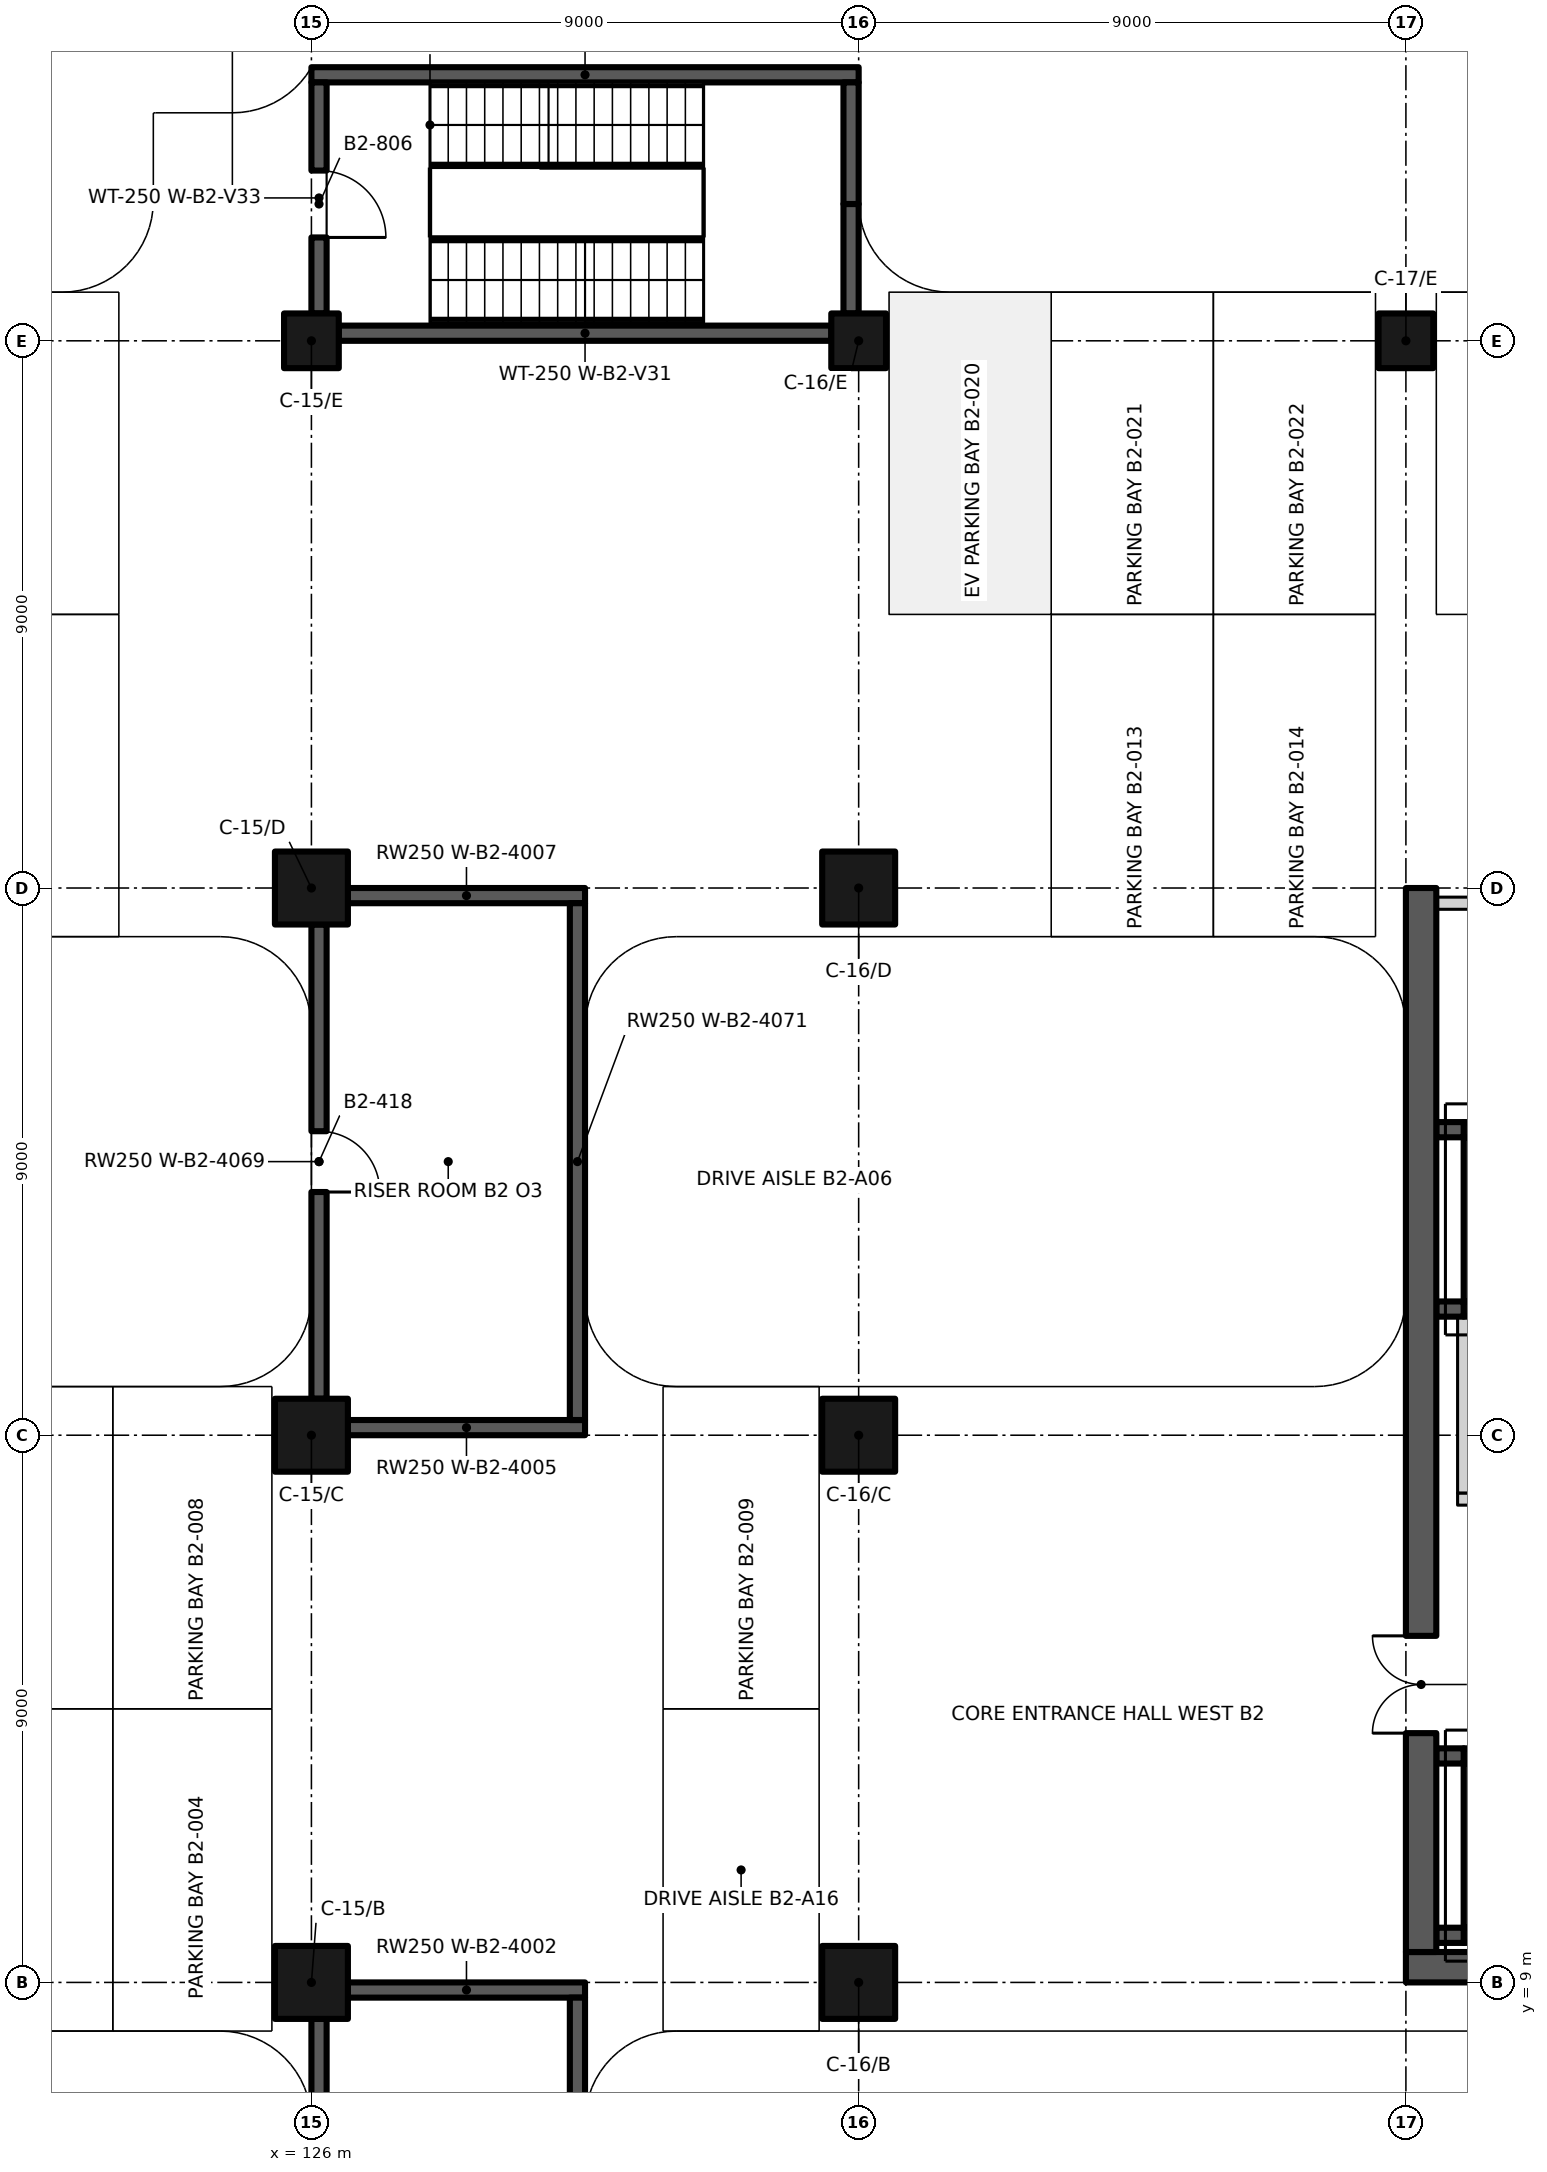
"""IFC4 building model, lengths in metres.
Left out: names, types, materials, properties, quantities, classifications, styles, units other than length and angle.
Written with IfcOpenShell. Run it as: python <this file> out.ifc"""

import sys

from ifc_helpers import new_model, si_unit, direction, frame, frame_2d, origin, origin_2d, place, context, subcontext, project, spatial, rectangle, extrude, element, fill, save


model = new_model("IFC4")
c1 = context("Model", 3, precision=1e-05, world=origin(), true_north=direction((0.0, 1.0)))
c2 = subcontext(c1, "Body", "Model", "MODEL_VIEW")
j1 = project(units=[si_unit("LENGTHUNIT", "METRE"), si_unit("PLANEANGLEUNIT", "RADIAN")], contexts=[c1])
p1 = place(None, origin())
s1 = spatial("IfcSite", under=j1, at=p1, CompositionType="ELEMENT")
p2 = place(p1, origin())
s2 = spatial("IfcBuilding", under=s1, at=p2, CompositionType="ELEMENT")
p3 = place(p2, frame((0.0, 0.0, -9.9)))
s3 = spatial("IfcBuildingStorey", under=s2, at=p3, CompositionType="ELEMENT", Elevation=-9.9)
for number, where, z_axis, x_axis in (
    (1, (126.0, 9.0, 0.0), (0.0, 0.0, 1.0), (1.0, 0.0, 0.0)),
    (2, (135.0, 9.0, 0.0), (0.0, 0.0, 1.0), (1.0, 0.0, 0.0)),
    (3, (126.0, 18.0, 0.0), (0.0, 0.0, 1.0), (1.0, 0.0, 0.0)),
    (4, (135.0, 18.0, 0.0), (0.0, 0.0, 1.0), (1.0, 0.0, 0.0)),
    (5, (126.0, 27.0, 0.0), (0.0, 0.0, 1.0), (1.0, 0.0, 0.0)),
    (6, (135.0, 27.0, 0.0), (0.0, 0.0, 1.0), (1.0, 0.0, 0.0)),
):
    element("IfcColumn", number, at=place(p3, frame(where, z_axis=z_axis, x_axis=x_axis)), inside=s3, PredefinedType="COLUMN", context=c2, shape_type="SweptSolid", body=[
        extrude(rectangle(XDim=1.2, YDim=1.2, at=origin_2d()), origin(), (0.0, 0.0, 1.0), 4.8),
    ])
for number, where, z_axis, x_axis in (
    (7, (126.0, 36.0, 0.0), (0.0, 0.0, 1.0), (1.0, 0.0, 0.0)),
    (8, (135.0, 36.0, 0.0), (0.0, 0.0, 1.0), (1.0, 0.0, 0.0)),
    (9, (144.0, 36.0, 0.0), (0.0, 0.0, 1.0), (1.0, 0.0, 0.0)),
):
    element("IfcColumn", number, at=place(p3, frame(where, z_axis=z_axis, x_axis=x_axis)), inside=s3, PredefinedType="COLUMN", context=c2, shape_type="SweptSolid", body=[
        extrude(rectangle(XDim=0.9, YDim=0.9, at=origin_2d()), origin(), (0.0, 0.0, 1.0), 4.8),
    ])
p4 = place(p3, frame((126.45, 36.125, 0.0), z_axis=(0.0, 0.0, 1.0), x_axis=(1.0, 0.0, 0.0)))
e10 = element("IfcWall", 10, at=p4, inside=s3, PredefinedType="SHEAR", context=c2, shape_type="SweptSolid", body=[
    extrude(rectangle(XDim=8.1, YDim=0.25, at=frame_2d((4.05, 0.0))), origin(), (0.0, 0.0, 1.0), 4.8),
])
p5 = place(p3, frame((126.0, 40.375, 0.0), z_axis=(0.0, 0.0, 1.0), x_axis=(1.0, 0.0, 0.0)))
e11 = element("IfcWall", 11, at=p5, inside=s3, PredefinedType="SHEAR", context=c2, shape_type="SweptSolid", body=[
    extrude(rectangle(XDim=9.0, YDim=0.25, at=frame_2d((4.5, 0.0))), origin(), (0.0, 0.0, 1.0), 4.8),
])
p6 = place(p3, frame((126.125, 36.45, 0.0), z_axis=(0.0, 0.0, 1.0), x_axis=(0.0, 1.0, 0.0)))
e12 = element("IfcWall", 12, at=p6, inside=s3, PredefinedType="SHEAR", context=c2, shape_type="SweptSolid", body=[
    extrude(rectangle(XDim=3.8, YDim=0.25, at=frame_2d((1.9, 0.0))), origin(), (0.0, 0.0, 1.0), 4.8),
])
p7 = place(p6, frame((2.35, 0.0, 0.0), z_axis=(0.0, 0.0, 1.0), x_axis=(-1.0, 0.0, 0.0)))
e13 = element("IfcOpeningElement", 13, at=p7, cuts=e12, PredefinedType="OPENING", context=c2, shape_type="SweptSolid", body=[
    extrude(rectangle(XDim=1.1, YDim=2.1, at=frame_2d((0.55, 1.05))), frame((0.0, 0.135, 0.0), z_axis=(0.0, -1.0, 0.0), x_axis=(1.0, 0.0, 0.0)), (0.0, 0.0, 1.0), 0.27),
])
p8 = place(p3, frame((134.875, 36.45, 0.0), z_axis=(0.0, 0.0, 1.0), x_axis=(0.0, 1.0, 0.0)))
e14 = element("IfcWall", 14, at=p8, inside=s3, PredefinedType="SHEAR", context=c2, shape_type="SweptSolid", body=[
    extrude(rectangle(XDim=1.8, YDim=0.25, at=frame_2d((0.9, 0.0))), origin(), (0.0, 0.0, 1.0), 4.8),
])
p9 = place(p3, frame((134.875, 38.25, 0.0), z_axis=(0.0, 0.0, 1.0), x_axis=(0.0, 1.0, 0.0)))
e15 = element("IfcWall", 15, at=p9, inside=s3, PredefinedType="SHEAR", context=c2, shape_type="SweptSolid", body=[
    extrude(rectangle(XDim=2.0, YDim=0.25, at=frame_2d((1.0, 0.0))), origin(), (0.0, 0.0, 1.0), 4.8),
])
p10 = place(p3, frame((144.95, 12.725, -1.6), z_axis=(0.0, 0.0, 1.0), x_axis=(1.0, 0.0, 0.0)))
e16 = element("IfcWall", 16, at=p10, inside=s3, PredefinedType="SHEAR", context=c2, shape_type="SweptSolid", body=[
    extrude(rectangle(XDim=12.05, YDim=0.25, at=frame_2d((6.025, 0.0))), origin(), (0.0, 0.0, 1.0), 6.4),
])
p11 = place(p10, frame((1.05, 0.0, 1.6)))
e17 = element("IfcOpeningElement", 17, at=p11, cuts=e16, PredefinedType="OPENING", context=c2, shape_type="SweptSolid", body=[
    extrude(rectangle(XDim=1.1, YDim=2.1, at=frame_2d((0.55, 1.05))), frame((0.0, 0.135, 0.0), z_axis=(0.0, -1.0, 0.0), x_axis=(1.0, 0.0, 0.0)), (0.0, 0.0, 1.0), 0.27),
])
p12 = place(p10, frame((4.0, 0.0, 1.6)))
e18 = element("IfcOpeningElement", 18, at=p12, cuts=e16, PredefinedType="OPENING", context=c2, shape_type="SweptSolid", body=[
    extrude(rectangle(XDim=1.1, YDim=2.1, at=frame_2d((0.55, 1.05))), frame((0.0, 0.135, 0.0), z_axis=(0.0, -1.0, 0.0), x_axis=(1.0, 0.0, 0.0)), (0.0, 0.0, 1.0), 0.27),
])
p13 = place(p10, frame((6.95, 0.0, 1.6)))
e19 = element("IfcOpeningElement", 19, at=p13, cuts=e16, PredefinedType="OPENING", context=c2, shape_type="SweptSolid", body=[
    extrude(rectangle(XDim=1.1, YDim=2.1, at=frame_2d((0.55, 1.05))), frame((0.0, 0.135, 0.0), z_axis=(0.0, -1.0, 0.0), x_axis=(1.0, 0.0, 0.0)), (0.0, 0.0, 1.0), 0.27),
])
p14 = place(p10, frame((9.9, 0.0, 1.6)))
e20 = element("IfcOpeningElement", 20, at=p14, cuts=e16, PredefinedType="OPENING", context=c2, shape_type="SweptSolid", body=[
    extrude(rectangle(XDim=1.1, YDim=2.1, at=frame_2d((0.55, 1.05))), frame((0.0, 0.135, 0.0), z_axis=(0.0, -1.0, 0.0), x_axis=(1.0, 0.0, 0.0)), (0.0, 0.0, 1.0), 0.27),
])
p15 = place(p3, frame((144.95, 9.775, -1.6), z_axis=(0.0, 0.0, 1.0), x_axis=(1.0, 0.0, 0.0)))
e21 = element("IfcWall", 21, at=p15, inside=s3, PredefinedType="SHEAR", context=c2, shape_type="SweptSolid", body=[
    extrude(rectangle(XDim=12.05, YDim=0.25, at=frame_2d((6.025, 0.0))), origin(), (0.0, 0.0, 1.0), 6.4),
])
for number, where, z_axis, x_axis in (
    (22, (144.5, 12.725, 0.0), (0.0, 0.0, 1.0), (1.0, 0.0, 0.0)),
    (23, (144.5, 9.775, 0.0), (0.0, 0.0, 1.0), (1.0, 0.0, 0.0)),
):
    element("IfcWall", number, at=place(p3, frame(where, z_axis=z_axis, x_axis=x_axis)), inside=s3, PredefinedType="SHEAR", context=c2, shape_type="SweptSolid", body=[
        extrude(rectangle(XDim=0.45, YDim=0.25, at=frame_2d((0.225, 0.0))), origin(), (0.0, 0.0, 1.0), 4.8),
    ])
p16 = place(p3, frame((145.075, 9.9, -1.6), z_axis=(0.0, 0.0, 1.0), x_axis=(0.0, 1.0, 0.0)))
e24 = element("IfcWall", 24, at=p16, inside=s3, PredefinedType="SHEAR", context=c2, shape_type="SweptSolid", body=[
    extrude(rectangle(XDim=2.7, YDim=0.25, at=frame_2d((1.35, 0.0))), origin(), (0.0, 0.0, 1.0), 6.4),
])
p17 = place(p3, frame((144.95, 20.075, -1.6), z_axis=(0.0, 0.0, 1.0), x_axis=(1.0, 0.0, 0.0)))
e25 = element("IfcWall", 25, at=p17, inside=s3, PredefinedType="SHEAR", context=c2, shape_type="SweptSolid", body=[
    extrude(rectangle(XDim=6.15, YDim=0.25, at=frame_2d((3.075, 0.0))), origin(), (0.0, 0.0, 1.0), 6.4),
])
p18 = place(p17, frame((1.05, 0.0, 1.6)))
e26 = element("IfcOpeningElement", 26, at=p18, cuts=e25, PredefinedType="OPENING", context=c2, shape_type="SweptSolid", body=[
    extrude(rectangle(XDim=1.1, YDim=2.1, at=frame_2d((0.55, 1.05))), frame((0.0, 0.135, 0.0), z_axis=(0.0, -1.0, 0.0), x_axis=(1.0, 0.0, 0.0)), (0.0, 0.0, 1.0), 0.27),
])
p19 = place(p17, frame((4.0, 0.0, 1.6)))
e27 = element("IfcOpeningElement", 27, at=p19, cuts=e25, PredefinedType="OPENING", context=c2, shape_type="SweptSolid", body=[
    extrude(rectangle(XDim=1.1, YDim=2.1, at=frame_2d((0.55, 1.05))), frame((0.0, 0.135, 0.0), z_axis=(0.0, -1.0, 0.0), x_axis=(1.0, 0.0, 0.0)), (0.0, 0.0, 1.0), 0.27),
])
p20 = place(p3, frame((144.95, 23.025, -1.6), z_axis=(0.0, 0.0, 1.0), x_axis=(1.0, 0.0, 0.0)))
e28 = element("IfcWall", 28, at=p20, inside=s3, PredefinedType="SHEAR", context=c2, shape_type="SweptSolid", body=[
    extrude(rectangle(XDim=6.15, YDim=0.25, at=frame_2d((3.075, 0.0))), origin(), (0.0, 0.0, 1.0), 6.4),
])
for number, where, z_axis, x_axis in (
    (29, (144.5, 20.075, 0.0), (0.0, 0.0, 1.0), (1.0, 0.0, 0.0)),
    (30, (144.5, 23.025, 0.0), (0.0, 0.0, 1.0), (1.0, 0.0, 0.0)),
):
    element("IfcWall", number, at=place(p3, frame(where, z_axis=z_axis, x_axis=x_axis)), inside=s3, PredefinedType="SHEAR", context=c2, shape_type="SweptSolid", body=[
        extrude(rectangle(XDim=0.45, YDim=0.25, at=frame_2d((0.225, 0.0))), origin(), (0.0, 0.0, 1.0), 4.8),
    ])
p21 = place(p3, frame((145.075, 20.2, -1.6), z_axis=(0.0, 0.0, 1.0), x_axis=(0.0, 1.0, 0.0)))
e31 = element("IfcWall", 31, at=p21, inside=s3, PredefinedType="SHEAR", context=c2, shape_type="SweptSolid", body=[
    extrude(rectangle(XDim=2.7, YDim=0.25, at=frame_2d((1.35, 0.0))), origin(), (0.0, 0.0, 1.0), 6.4),
])
p22 = place(p3, frame((126.6, 8.875, 0.0), z_axis=(0.0, 0.0, 1.0), x_axis=(1.0, 0.0, 0.0)))
e32 = element("IfcWall", 32, at=p22, inside=s3, PredefinedType="SOLIDWALL", context=c2, shape_type="SweptSolid", body=[
    extrude(rectangle(XDim=3.9, YDim=0.25, at=frame_2d((1.95, 0.0))), origin(), (0.0, 0.0, 1.0), 4.5),
])
p23 = place(p3, frame((144.0, 9.25, 0.0), z_axis=(0.0, 0.0, 1.0), x_axis=(1.0, 0.0, 0.0)))
e33 = element("IfcWall", 33, at=p23, inside=s3, PredefinedType="SHEAR", context=c2, shape_type="SweptSolid", body=[
    extrude(rectangle(XDim=18.0, YDim=0.5, at=frame_2d((9.0, 0.0))), origin(), (0.0, 0.0, 1.0), 4.5),
])
p24 = place(p23, frame((16.425, 0.0, 0.0), z_axis=(0.0, 0.0, 1.0), x_axis=(-1.0, 0.0, 0.0)))
e34 = element("IfcOpeningElement", 34, at=p24, cuts=e33, PredefinedType="OPENING", context=c2, shape_type="SweptSolid", body=[
    extrude(rectangle(XDim=2.1, YDim=2.4, at=frame_2d((1.05, 1.2))), frame((0.0, 0.26, 0.0), z_axis=(0.0, -1.0, 0.0), x_axis=(1.0, 0.0, 0.0)), (0.0, 0.0, 1.0), 0.52),
])
p25 = place(p3, frame((144.85, 16.95, 0.0), z_axis=(0.0, 0.0, 1.0), x_axis=(1.0, 0.0, 0.0)))
e35 = element("IfcWall", 35, at=p25, inside=s3, PredefinedType="PARTITIONING", context=c2, shape_type="SweptSolid", body=[
    extrude(rectangle(XDim=6.35, YDim=0.2, at=frame_2d((3.175, 0.0))), origin(), (0.0, 0.0, 1.0), 4.5),
])
p26 = place(p25, frame((3.775, 0.0, 0.0), z_axis=(0.0, 0.0, 1.0), x_axis=(-1.0, 0.0, 0.0)))
e36 = element("IfcOpeningElement", 36, at=p26, cuts=e35, PredefinedType="OPENING", context=c2, shape_type="SweptSolid", body=[
    extrude(rectangle(XDim=1.2, YDim=2.1, at=frame_2d((0.6, 1.05))), frame((0.0, 0.11, 0.0), z_axis=(0.0, -1.0, 0.0), x_axis=(1.0, 0.0, 0.0)), (0.0, 0.0, 1.0), 0.22),
])
p27 = place(p3, frame((126.6, 18.125, 0.0), z_axis=(0.0, 0.0, 1.0), x_axis=(1.0, 0.0, 0.0)))
e37 = element("IfcWall", 37, at=p27, inside=s3, PredefinedType="SOLIDWALL", context=c2, shape_type="SweptSolid", body=[
    extrude(rectangle(XDim=3.9, YDim=0.25, at=frame_2d((1.95, 0.0))), origin(), (0.0, 0.0, 1.0), 4.5),
])
p28 = place(p3, frame((144.5, 26.75, 0.0), z_axis=(0.0, 0.0, 1.0), x_axis=(1.0, 0.0, 0.0)))
e38 = element("IfcWall", 38, at=p28, inside=s3, PredefinedType="PARTITIONING", context=c2, shape_type="SweptSolid", body=[
    extrude(rectangle(XDim=17.0, YDim=0.2, at=frame_2d((8.5, 0.0))), origin(), (0.0, 0.0, 1.0), 4.5),
])
p29 = place(p3, frame((126.6, 26.875, 0.0), z_axis=(0.0, 0.0, 1.0), x_axis=(1.0, 0.0, 0.0)))
e39 = element("IfcWall", 39, at=p29, inside=s3, PredefinedType="SOLIDWALL", context=c2, shape_type="SweptSolid", body=[
    extrude(rectangle(XDim=3.9, YDim=0.25, at=frame_2d((1.95, 0.0))), origin(), (0.0, 0.0, 1.0), 4.5),
])
p30 = place(p3, frame((126.125, 0.6, 0.0), z_axis=(0.0, 0.0, 1.0), x_axis=(0.0, 1.0, 0.0)))
e40 = element("IfcWall", 40, at=p30, inside=s3, PredefinedType="SOLIDWALL", context=c2, shape_type="SweptSolid", body=[
    extrude(rectangle(XDim=7.8, YDim=0.25, at=frame_2d((3.9, 0.0))), origin(), (0.0, 0.0, 1.0), 4.5),
])
p31 = place(p3, frame((126.125, 18.6, 0.0), z_axis=(0.0, 0.0, 1.0), x_axis=(0.0, 1.0, 0.0)))
e41 = element("IfcWall", 41, at=p31, inside=s3, PredefinedType="SOLIDWALL", context=c2, shape_type="SweptSolid", body=[
    extrude(rectangle(XDim=7.8, YDim=0.25, at=frame_2d((3.9, 0.0))), origin(), (0.0, 0.0, 1.0), 4.5),
])
p32 = place(p31, frame((4.4, 0.0, 0.0), z_axis=(0.0, 0.0, 1.0), x_axis=(-1.0, 0.0, 0.0)))
e42 = element("IfcOpeningElement", 42, at=p32, cuts=e41, PredefinedType="OPENING", context=c2, shape_type="SweptSolid", body=[
    extrude(rectangle(XDim=1.0, YDim=2.1, at=frame_2d((0.5, 1.05))), frame((0.0, 0.135, 0.0), z_axis=(0.0, -1.0, 0.0), x_axis=(1.0, 0.0, 0.0)), (0.0, 0.0, 1.0), 0.27),
])
p33 = place(p3, frame((130.375, 0.2, 0.0), z_axis=(0.0, 0.0, 1.0), x_axis=(0.0, 1.0, 0.0)))
e43 = element("IfcWall", 43, at=p33, inside=s3, PredefinedType="SOLIDWALL", context=c2, shape_type="SweptSolid", body=[
    extrude(rectangle(XDim=8.55, YDim=0.25, at=frame_2d((4.275, 0.0))), origin(), (0.0, 0.0, 1.0), 4.5),
])
p34 = place(p33, frame((4.738, 0.0, 0.0)))
e44 = element("IfcOpeningElement", 44, at=p34, cuts=e43, PredefinedType="OPENING", context=c2, shape_type="SweptSolid", body=[
    extrude(rectangle(XDim=1.0, YDim=2.1, at=frame_2d((0.5, 1.05))), frame((0.0, 0.135, 0.0), z_axis=(0.0, -1.0, 0.0), x_axis=(1.0, 0.0, 0.0)), (0.0, 0.0, 1.0), 0.27),
])
p35 = place(p3, frame((130.375, 18.25, 0.0), z_axis=(0.0, 0.0, 1.0), x_axis=(0.0, 1.0, 0.0)))
e45 = element("IfcWall", 45, at=p35, inside=s3, PredefinedType="SOLIDWALL", context=c2, shape_type="SweptSolid", body=[
    extrude(rectangle(XDim=8.5, YDim=0.25, at=frame_2d((4.25, 0.0))), origin(), (0.0, 0.0, 1.0), 4.5),
])
p36 = place(p3, frame((144.25, 9.5, 0.0), z_axis=(0.0, 0.0, 1.0), x_axis=(0.0, 1.0, 0.0)))
e46 = element("IfcWall", 46, at=p36, inside=s3, PredefinedType="SHEAR", context=c2, shape_type="SweptSolid", body=[
    extrude(rectangle(XDim=17.5, YDim=0.5, at=frame_2d((8.75, 0.0))), origin(), (0.0, 0.0, 1.0), 4.5),
])
p37 = place(p36, frame((3.6, 0.0, 0.0)))
e47 = element("IfcOpeningElement", 47, at=p37, cuts=e46, PredefinedType="OPENING", context=c2, shape_type="SweptSolid", body=[
    extrude(rectangle(XDim=1.6, YDim=2.4, at=frame_2d((0.8, 1.2))), frame((0.0, 0.26, 0.0), z_axis=(0.0, -1.0, 0.0), x_axis=(1.0, 0.0, 0.0)), (0.0, 0.0, 1.0), 0.52),
])
p38 = place(p3, frame((144.95, 17.05, 0.0), z_axis=(0.0, 0.0, 1.0), x_axis=(0.0, 1.0, 0.0)))
e48 = element("IfcWall", 48, at=p38, inside=s3, PredefinedType="PARTITIONING", context=c2, shape_type="SweptSolid", body=[
    extrude(rectangle(XDim=2.9, YDim=0.2, at=frame_2d((1.45, 0.0))), origin(), (0.0, 0.0, 1.0), 4.5),
])
p39 = place(p7, origin())
e49 = element("IfcDoor", 49, at=p39, inside=s3, OperationType="SINGLE_SWING_RIGHT", PredefinedType="DOOR", context=c2, shape_type="SweptSolid", body=[
    extrude(rectangle(XDim=1.1, YDim=2.1, at=frame_2d((0.55, 1.05))), frame((0.0, 0.025, 0.0), z_axis=(0.0, -1.0, 0.0), x_axis=(1.0, 0.0, 0.0)), (0.0, 0.0, 1.0), 0.05),
])
fill(e13, e49)
p40 = place(p37, origin())
e50 = element("IfcDoor", 50, at=p40, inside=s3, OperationType="DOUBLE_DOOR_SINGLE_SWING", PredefinedType="DOOR", context=c2, shape_type="SweptSolid", body=[
    extrude(rectangle(XDim=1.6, YDim=2.4, at=frame_2d((0.8, 1.2))), frame((0.0, 0.025, 0.0), z_axis=(0.0, -1.0, 0.0), x_axis=(1.0, 0.0, 0.0)), (0.0, 0.0, 1.0), 0.05),
])
fill(e47, e50)
p41 = place(p32, origin())
e51 = element("IfcDoor", 51, at=p41, inside=s3, OperationType="SINGLE_SWING_RIGHT", PredefinedType="DOOR", context=c2, shape_type="SweptSolid", body=[
    extrude(rectangle(XDim=1.0, YDim=2.1, at=frame_2d((0.5, 1.05))), frame((0.0, 0.025, 0.0), z_axis=(0.0, -1.0, 0.0), x_axis=(1.0, 0.0, 0.0)), (0.0, 0.0, 1.0), 0.05),
])
fill(e42, e51)
save(model, sys.argv[1])
